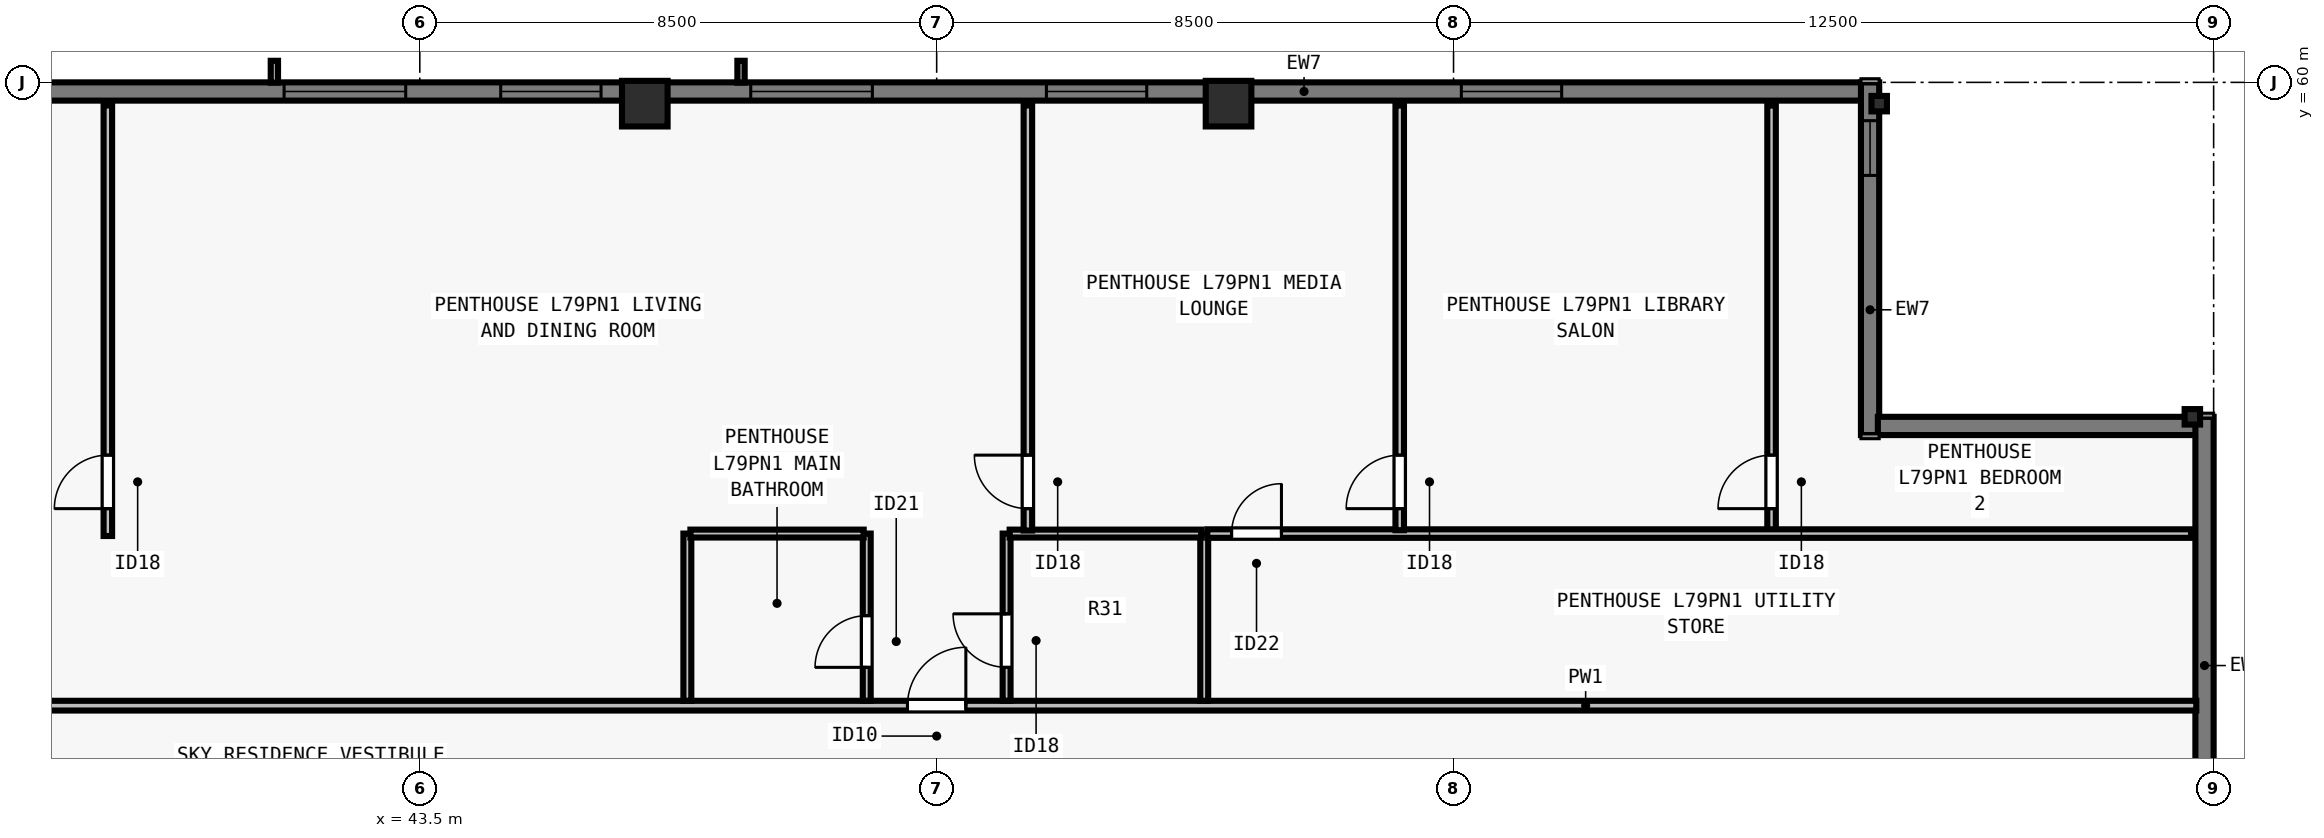
"""IFC4 building model, lengths in metres.
Left out: names, types, materials, properties, quantities, classifications, styles, units other than length and angle.
Written with IfcOpenShell. Run it as: python <this file> out.ifc"""

import sys

from ifc_helpers import new_model, si_unit, direction, frame, frame_2d, origin, origin_2d, place, context, subcontext, project, spatial, rectangle, i_section, extrude, element, fill, save


model = new_model("IFC4")
c1 = context("Model", 3, precision=1e-05, world=origin(), true_north=direction((0.0, 1.0)))
c2 = subcontext(c1, "Body", "Model", "MODEL_VIEW")
j1 = project(units=[si_unit("LENGTHUNIT", "METRE"), si_unit("PLANEANGLEUNIT", "RADIAN")], contexts=[c1])
p1 = place(None, origin())
s1 = spatial("IfcSite", under=j1, at=p1, CompositionType="ELEMENT")
p2 = place(p1, origin())
s2 = spatial("IfcBuilding", under=s1, at=p2, CompositionType="ELEMENT")
p3 = place(p2, frame((0.0, 0.0, 287.5)))
s3 = spatial("IfcBuildingStorey", under=s2, at=p3, CompositionType="ELEMENT", Elevation=287.5)
for number, where, z_axis, x_axis in (
    (1, (72.65, 54.5, 0.0), (0.0, 0.0, 1.0), (0.0, 1.0, 0.0)),
    (2, (67.5, 59.65, 0.0), (0.0, 0.0, 1.0), (1.0, 0.0, 0.0)),
):
    element("IfcColumn", number, at=place(p3, frame(where, z_axis=z_axis, x_axis=x_axis)), inside=s3, PredefinedType="COLUMN", context=c2, shape_type="SweptSolid", body=[
        extrude(i_section(OverallWidth=0.254, OverallDepth=0.254, WebThickness=0.009, FlangeThickness=0.014, FilletRadius=0.013, at=origin_2d()), origin(), (0.0, 0.0, 1.0), 3.5),
    ])
for number, where, z_axis, x_axis in (
    (3, (56.8, 59.65, 0.0), (0.0, 0.0, 1.0), (1.0, 0.0, 0.0)),
    (4, (47.2, 59.65, 0.0), (0.0, 0.0, 1.0), (1.0, 0.0, 0.0)),
):
    element("IfcColumn", number, at=place(p3, frame(where, z_axis=z_axis, x_axis=x_axis)), inside=s3, PredefinedType="COLUMN", context=c2, shape_type="SweptSolid", body=[
        extrude(rectangle(XDim=0.75, YDim=0.75, at=origin_2d()), origin(), (0.0, 0.0, 1.0), 3.5),
    ])
p4 = place(p3, frame((36.5, 59.85, 0.0), z_axis=(0.0, 0.0, 1.0), x_axis=(1.0, 0.0, 0.0)))
e5 = element("IfcWall", 5, at=p4, inside=s3, PredefinedType="SOLIDWALL", context=c2, shape_type="SweptSolid", body=[
    extrude(rectangle(XDim=30.722, YDim=0.3, at=frame_2d((15.361, 0.0))), origin(), (0.0, 0.0, 1.0), 3.29),
])
p5 = place(p4, frame((4.769, 0.0, 0.8)))
e6 = element("IfcOpeningElement", 6, at=p5, cuts=e5, PredefinedType="OPENING", context=c2, shape_type="SweptSolid", body=[
    extrude(rectangle(XDim=2.0, YDim=1.758, at=frame_2d((1.0, 0.879))), frame((0.0, 0.16, 0.0), z_axis=(0.0, -1.0, 0.0), x_axis=(1.0, 0.0, 0.0)), (0.0, 0.0, 1.0), 0.32),
])
p6 = place(p4, frame((8.331, 0.0, 0.8)))
e7 = element("IfcOpeningElement", 7, at=p6, cuts=e5, PredefinedType="OPENING", context=c2, shape_type="SweptSolid", body=[
    extrude(rectangle(XDim=1.65, YDim=1.758, at=frame_2d((0.825, 0.879))), frame((0.0, 0.16, 0.0), z_axis=(0.0, -1.0, 0.0), x_axis=(1.0, 0.0, 0.0)), (0.0, 0.0, 1.0), 0.32),
])
p7 = place(p4, frame((12.442, 0.0, 0.8)))
e8 = element("IfcOpeningElement", 8, at=p7, cuts=e5, PredefinedType="OPENING", context=c2, shape_type="SweptSolid", body=[
    extrude(rectangle(XDim=2.0, YDim=1.758, at=frame_2d((1.0, 0.879))), frame((0.0, 0.16, 0.0), z_axis=(0.0, -1.0, 0.0), x_axis=(1.0, 0.0, 0.0)), (0.0, 0.0, 1.0), 0.32),
])
p8 = place(p4, frame((17.304, 0.0, 0.8)))
e9 = element("IfcOpeningElement", 9, at=p8, cuts=e5, PredefinedType="OPENING", context=c2, shape_type="SweptSolid", body=[
    extrude(rectangle(XDim=1.65, YDim=1.758, at=frame_2d((0.825, 0.879))), frame((0.0, 0.16, 0.0), z_axis=(0.0, -1.0, 0.0), x_axis=(1.0, 0.0, 0.0)), (0.0, 0.0, 1.0), 0.32),
])
p9 = place(p4, frame((24.128, 0.0, 0.8)))
e10 = element("IfcOpeningElement", 10, at=p9, cuts=e5, PredefinedType="OPENING", context=c2, shape_type="SweptSolid", body=[
    extrude(rectangle(XDim=1.65, YDim=1.758, at=frame_2d((0.825, 0.879))), frame((0.0, 0.16, 0.0), z_axis=(0.0, -1.0, 0.0), x_axis=(1.0, 0.0, 0.0)), (0.0, 0.0, 1.0), 0.32),
])
p10 = place(p3, frame((67.35, 60.0, 0.0), z_axis=(0.0, 0.0, 1.0), x_axis=(0.0, -1.0, 0.0)))
e11 = element("IfcWall", 11, at=p10, inside=s3, PredefinedType="SOLIDWALL", context=c2, shape_type="SweptSolid", body=[
    extrude(rectangle(XDim=5.8, YDim=0.3, at=frame_2d((2.9, 0.0))), origin(), (0.0, 0.0, 1.0), 3.29),
])
p11 = place(p10, frame((0.63, 0.0, 0.8)))
e12 = element("IfcOpeningElement", 12, at=p11, cuts=e11, PredefinedType="OPENING", context=c2, shape_type="SweptSolid", body=[
    extrude(rectangle(XDim=0.9, YDim=1.75, at=frame_2d((0.45, 0.875))), frame((0.0, 0.16, 0.0), z_axis=(0.0, -1.0, 0.0), x_axis=(1.0, 0.0, 0.0)), (0.0, 0.0, 1.0), 0.32),
])
p12 = place(p3, frame((67.478, 54.35, 0.0), z_axis=(0.0, 0.0, 1.0), x_axis=(1.0, 0.0, 0.0)))
e13 = element("IfcWall", 13, at=p12, inside=s3, PredefinedType="SOLIDWALL", context=c2, shape_type="SweptSolid", body=[
    extrude(rectangle(XDim=5.244, YDim=0.3, at=frame_2d((2.622, 0.0))), origin(), (0.0, 0.0, 1.0), 3.29),
])
p13 = place(p3, frame((72.85, 54.5, 0.0), z_axis=(0.0, 0.0, 1.0), x_axis=(0.0, -1.0, 0.0)))
e14 = element("IfcWall", 14, at=p13, inside=s3, PredefinedType="SOLIDWALL", context=c2, shape_type="SweptSolid", body=[
    extrude(rectangle(XDim=30.722, YDim=0.3, at=frame_2d((15.361, 0.0))), origin(), (0.0, 0.0, 1.0), 3.29),
])
p14 = place(p13, frame((8.331, 0.0, 0.8)))
e15 = element("IfcOpeningElement", 15, at=p14, cuts=e14, PredefinedType="OPENING", context=c2, shape_type="SweptSolid", body=[
    extrude(rectangle(XDim=1.65, YDim=1.758, at=frame_2d((0.825, 0.879))), frame((0.0, 0.16, 0.0), z_axis=(0.0, -1.0, 0.0), x_axis=(1.0, 0.0, 0.0)), (0.0, 0.0, 1.0), 0.32),
])
p15 = place(p13, frame((11.593, 0.0, 0.8)))
e16 = element("IfcOpeningElement", 16, at=p15, cuts=e14, PredefinedType="OPENING", context=c2, shape_type="SweptSolid", body=[
    extrude(rectangle(XDim=2.0, YDim=1.758, at=frame_2d((1.0, 0.879))), frame((0.0, 0.16, 0.0), z_axis=(0.0, -1.0, 0.0), x_axis=(1.0, 0.0, 0.0)), (0.0, 0.0, 1.0), 0.32),
])
p16 = place(p13, frame((16.455, 0.0, 0.8)))
e17 = element("IfcOpeningElement", 17, at=p16, cuts=e14, PredefinedType="OPENING", context=c2, shape_type="SweptSolid", body=[
    extrude(rectangle(XDim=1.65, YDim=1.758, at=frame_2d((0.825, 0.879))), frame((0.0, 0.16, 0.0), z_axis=(0.0, -1.0, 0.0), x_axis=(1.0, 0.0, 0.0)), (0.0, 0.0, 1.0), 0.32),
])
p17 = place(p13, frame((20.967, 0.0, 0.8)))
e18 = element("IfcOpeningElement", 18, at=p17, cuts=e14, PredefinedType="OPENING", context=c2, shape_type="SweptSolid", body=[
    extrude(rectangle(XDim=2.0, YDim=1.758, at=frame_2d((1.0, 0.879))), frame((0.0, 0.16, 0.0), z_axis=(0.0, -1.0, 0.0), x_axis=(1.0, 0.0, 0.0)), (0.0, 0.0, 1.0), 0.32),
])
p18 = place(p3, frame((31.285, 49.75, 0.0), z_axis=(0.0, 0.0, 1.0), x_axis=(1.0, 0.0, 0.0)))
e19 = element("IfcWall", 19, at=p18, inside=s3, PredefinedType="PARTITIONING", context=c2, shape_type="SweptSolid", body=[
    extrude(rectangle(XDim=41.43, YDim=0.16, at=frame_2d((20.715, 0.0))), origin(), (0.0, 0.0, 1.0), 3.009),
])
p19 = place(p18, frame((20.235, 0.0, 0.0)))
e20 = element("IfcOpeningElement", 20, at=p19, cuts=e19, PredefinedType="OPENING", context=c2, shape_type="SweptSolid", body=[
    extrude(rectangle(XDim=0.96, YDim=2.18, at=frame_2d((0.48, 1.09))), frame((0.0, 0.09, 0.0), z_axis=(0.0, -1.0, 0.0), x_axis=(1.0, 0.0, 0.0)), (0.0, 0.0, 1.0), 0.18),
])
p20 = place(p3, frame((47.9, 49.83, 0.0), z_axis=(0.0, 0.0, 1.0), x_axis=(0.0, 1.0, 0.0)))
e21 = element("IfcWall", 21, at=p20, inside=s3, PredefinedType="PLUMBINGWALL", context=c2, shape_type="SweptSolid", body=[
    extrude(rectangle(XDim=2.75, YDim=0.13, at=frame_2d((1.375, 0.0))), origin(), (0.0, 0.0, 1.0), 3.29),
])
p21 = place(p3, frame((50.85, 49.83, 0.0), z_axis=(0.0, 0.0, 1.0), x_axis=(0.0, 1.0, 0.0)))
e22 = element("IfcWall", 22, at=p21, inside=s3, PredefinedType="PLUMBINGWALL", context=c2, shape_type="SweptSolid", body=[
    extrude(rectangle(XDim=2.75, YDim=0.13, at=frame_2d((1.375, 0.0))), origin(), (0.0, 0.0, 1.0), 3.009),
])
p22 = place(p21, frame((0.55, 0.0, 0.0)))
e23 = element("IfcOpeningElement", 23, at=p22, cuts=e22, PredefinedType="OPENING", context=c2, shape_type="SweptSolid", body=[
    extrude(rectangle(XDim=0.85, YDim=2.08, at=frame_2d((0.425, 1.04))), frame((0.0, 0.075, 0.0), z_axis=(0.0, -1.0, 0.0), x_axis=(1.0, 0.0, 0.0)), (0.0, 0.0, 1.0), 0.15),
])
p23 = place(p3, frame((47.95, 52.58, 0.0), z_axis=(0.0, 0.0, 1.0), x_axis=(1.0, 0.0, 0.0)))
e24 = element("IfcWall", 24, at=p23, inside=s3, PredefinedType="PLUMBINGWALL", context=c2, shape_type="SweptSolid", body=[
    extrude(rectangle(XDim=2.85, YDim=0.13, at=frame_2d((1.425, 0.0))), origin(), (0.0, 0.0, 1.0), 3.29),
])
p24 = place(p3, frame((56.4, 49.83, 0.0), z_axis=(0.0, 0.0, 1.0), x_axis=(0.0, 1.0, 0.0)))
e25 = element("IfcWall", 25, at=p24, inside=s3, PredefinedType="PLUMBINGWALL", context=c2, shape_type="SweptSolid", body=[
    extrude(rectangle(XDim=2.75, YDim=0.13, at=frame_2d((1.375, 0.0))), origin(), (0.0, 0.0, 1.0), 3.29),
])
p25 = place(p3, frame((53.15, 49.83, 0.0), z_axis=(0.0, 0.0, 1.0), x_axis=(0.0, 1.0, 0.0)))
e26 = element("IfcWall", 26, at=p25, inside=s3, PredefinedType="PLUMBINGWALL", context=c2, shape_type="SweptSolid", body=[
    extrude(rectangle(XDim=2.75, YDim=0.13, at=frame_2d((1.375, 0.0))), origin(), (0.0, 0.0, 1.0), 3.29),
])
p26 = place(p25, frame((0.55, 0.0, 0.0)))
e27 = element("IfcOpeningElement", 27, at=p26, cuts=e26, PredefinedType="OPENING", context=c2, shape_type="SweptSolid", body=[
    extrude(rectangle(XDim=0.88, YDim=2.1, at=frame_2d((0.44, 1.05))), frame((0.0, 0.075, 0.0), z_axis=(0.0, -1.0, 0.0), x_axis=(1.0, 0.0, 0.0)), (0.0, 0.0, 1.0), 0.15),
])
p27 = place(p3, frame((53.2, 52.58, 0.0), z_axis=(0.0, 0.0, 1.0), x_axis=(1.0, 0.0, 0.0)))
e28 = element("IfcWall", 28, at=p27, inside=s3, PredefinedType="PLUMBINGWALL", context=c2, shape_type="SweptSolid", body=[
    extrude(rectangle(XDim=3.15, YDim=0.13, at=frame_2d((1.575, 0.0))), origin(), (0.0, 0.0, 1.0), 3.29),
])
p28 = place(p3, frame((38.37, 52.54, 0.0), z_axis=(0.0, 0.0, 1.0), x_axis=(0.0, 1.0, 0.0)))
e29 = element("IfcWall", 29, at=p28, inside=s3, PredefinedType="PARTITIONING", context=c2, shape_type="SweptSolid", body=[
    extrude(rectangle(XDim=7.08, YDim=0.14, at=frame_2d((3.54, 0.0))), origin(), (0.0, 0.0, 1.0), 2.653),
])
p29 = place(p28, frame((0.45, 0.0, 0.0)))
e30 = element("IfcOpeningElement", 30, at=p29, cuts=e29, PredefinedType="OPENING", context=c2, shape_type="SweptSolid", body=[
    extrude(rectangle(XDim=0.88, YDim=2.1, at=frame_2d((0.44, 1.05))), frame((0.0, 0.08, 0.0), z_axis=(0.0, -1.0, 0.0), x_axis=(1.0, 0.0, 0.0)), (0.0, 0.0, 1.0), 0.16),
])
p30 = place(p3, frame((65.73, 52.54, 0.0), z_axis=(0.0, 0.0, 1.0), x_axis=(0.0, 1.0, 0.0)))
e31 = element("IfcWall", 31, at=p30, inside=s3, PredefinedType="PARTITIONING", context=c2, shape_type="SweptSolid", body=[
    extrude(rectangle(XDim=7.08, YDim=0.14, at=frame_2d((3.54, 0.0))), origin(), (0.0, 0.0, 1.0), 2.653),
])
p31 = place(p30, frame((0.45, 0.0, 0.0)))
e32 = element("IfcOpeningElement", 32, at=p31, cuts=e31, PredefinedType="OPENING", context=c2, shape_type="SweptSolid", body=[
    extrude(rectangle(XDim=0.88, YDim=2.1, at=frame_2d((0.44, 1.05))), frame((0.0, 0.08, 0.0), z_axis=(0.0, -1.0, 0.0), x_axis=(1.0, 0.0, 0.0)), (0.0, 0.0, 1.0), 0.16),
])
p32 = place(p3, frame((56.45, 52.58, 0.0), z_axis=(0.0, 0.0, 1.0), x_axis=(1.0, 0.0, 0.0)))
e33 = element("IfcWall", 33, at=p32, inside=s3, PredefinedType="PARTITIONING", context=c2, shape_type="SweptSolid", body=[
    extrude(rectangle(XDim=16.18, YDim=0.14, at=frame_2d((8.09, 0.0))), origin(), (0.0, 0.0, 1.0), 3.009),
])
p33 = place(p32, frame((0.4, 0.0, 0.0)))
e34 = element("IfcOpeningElement", 34, at=p33, cuts=e33, PredefinedType="OPENING", context=c2, shape_type="SweptSolid", body=[
    extrude(rectangle(XDim=0.82, YDim=2.1, at=frame_2d((0.41, 1.05))), frame((0.0, 0.08, 0.0), z_axis=(0.0, -1.0, 0.0), x_axis=(1.0, 0.0, 0.0)), (0.0, 0.0, 1.0), 0.16),
])
p34 = place(p3, frame((53.5, 52.63, 0.0), z_axis=(0.0, 0.0, 1.0), x_axis=(0.0, 1.0, 0.0)))
e35 = element("IfcWall", 35, at=p34, inside=s3, PredefinedType="PARTITIONING", context=c2, shape_type="SweptSolid", body=[
    extrude(rectangle(XDim=6.99, YDim=0.14, at=frame_2d((3.495, 0.0))), origin(), (0.0, 0.0, 1.0), 3.009),
])
p35 = place(p34, frame((0.36, 0.0, 0.0)))
e36 = element("IfcOpeningElement", 36, at=p35, cuts=e35, PredefinedType="OPENING", context=c2, shape_type="SweptSolid", body=[
    extrude(rectangle(XDim=0.88, YDim=2.1, at=frame_2d((0.44, 1.05))), frame((0.0, 0.08, 0.0), z_axis=(0.0, -1.0, 0.0), x_axis=(1.0, 0.0, 0.0)), (0.0, 0.0, 1.0), 0.16),
])
p36 = place(p3, frame((59.615, 52.635, 0.0), z_axis=(0.0, 0.0, 1.0), x_axis=(0.0, 1.0, 0.0)))
e37 = element("IfcWall", 37, at=p36, inside=s3, PredefinedType="PARTITIONING", context=c2, shape_type="SweptSolid", body=[
    extrude(rectangle(XDim=6.985, YDim=0.14, at=frame_2d((3.493, 0.0))), origin(), (0.0, 0.0, 1.0), 3.29),
])
p37 = place(p36, frame((0.355, 0.0, 0.0)))
e38 = element("IfcOpeningElement", 38, at=p37, cuts=e37, PredefinedType="OPENING", context=c2, shape_type="SweptSolid", body=[
    extrude(rectangle(XDim=0.88, YDim=2.1, at=frame_2d((0.44, 1.05))), frame((0.0, 0.08, 0.0), z_axis=(0.0, -1.0, 0.0), x_axis=(1.0, 0.0, 0.0)), (0.0, 0.0, 1.0), 0.16),
])
p38 = place(p5, origin())
e39 = element("IfcWindow", 39, at=p38, inside=s3, PartitioningType="SINGLE_PANEL", PredefinedType="WINDOW", context=c2, shape_type="SweptSolid", body=[
    extrude(rectangle(XDim=2.0, YDim=1.758, at=frame_2d((1.0, 0.879))), frame((0.0, -0.05, 0.0), z_axis=(0.0, -1.0, 0.0), x_axis=(1.0, 0.0, 0.0)), (0.0, 0.0, 1.0), 0.06),
])
fill(e6, e39)
p39 = place(p6, origin())
e40 = element("IfcWindow", 40, at=p39, inside=s3, PartitioningType="SINGLE_PANEL", PredefinedType="WINDOW", context=c2, shape_type="SweptSolid", body=[
    extrude(rectangle(XDim=1.65, YDim=1.758, at=frame_2d((0.825, 0.879))), frame((0.0, -0.05, 0.0), z_axis=(0.0, -1.0, 0.0), x_axis=(1.0, 0.0, 0.0)), (0.0, 0.0, 1.0), 0.06),
])
fill(e7, e40)
p40 = place(p7, origin())
e41 = element("IfcWindow", 41, at=p40, inside=s3, PartitioningType="SINGLE_PANEL", PredefinedType="WINDOW", context=c2, shape_type="SweptSolid", body=[
    extrude(rectangle(XDim=2.0, YDim=1.758, at=frame_2d((1.0, 0.879))), frame((0.0, -0.05, 0.0), z_axis=(0.0, -1.0, 0.0), x_axis=(1.0, 0.0, 0.0)), (0.0, 0.0, 1.0), 0.06),
])
fill(e8, e41)
p41 = place(p8, origin())
e42 = element("IfcWindow", 42, at=p41, inside=s3, PartitioningType="SINGLE_PANEL", PredefinedType="WINDOW", context=c2, shape_type="SweptSolid", body=[
    extrude(rectangle(XDim=1.65, YDim=1.758, at=frame_2d((0.825, 0.879))), frame((0.0, -0.05, 0.0), z_axis=(0.0, -1.0, 0.0), x_axis=(1.0, 0.0, 0.0)), (0.0, 0.0, 1.0), 0.06),
])
fill(e9, e42)
p42 = place(p9, origin())
e43 = element("IfcWindow", 43, at=p42, inside=s3, PartitioningType="SINGLE_PANEL", PredefinedType="WINDOW", context=c2, shape_type="SweptSolid", body=[
    extrude(rectangle(XDim=1.65, YDim=1.758, at=frame_2d((0.825, 0.879))), frame((0.0, -0.05, 0.0), z_axis=(0.0, -1.0, 0.0), x_axis=(1.0, 0.0, 0.0)), (0.0, 0.0, 1.0), 0.06),
])
fill(e10, e43)
p43 = place(p11, origin())
e44 = element("IfcWindow", 44, at=p43, inside=s3, PartitioningType="SINGLE_PANEL", PredefinedType="WINDOW", context=c2, shape_type="SweptSolid", body=[
    extrude(rectangle(XDim=0.9, YDim=1.75, at=frame_2d((0.45, 0.875))), frame((0.0, -0.04, 0.0), z_axis=(0.0, -1.0, 0.0), x_axis=(1.0, 0.0, 0.0)), (0.0, 0.0, 1.0), 0.06),
])
fill(e12, e44)
p44 = place(p22, origin())
e45 = element("IfcDoor", 45, at=p44, inside=s3, OperationType="SINGLE_SWING_LEFT", PredefinedType="DOOR", context=c2, shape_type="SweptSolid", body=[
    extrude(rectangle(XDim=0.85, YDim=2.08, at=frame_2d((0.425, 1.04))), frame((0.0, 0.025, 0.0), z_axis=(0.0, -1.0, 0.0), x_axis=(1.0, 0.0, 0.0)), (0.0, 0.0, 1.0), 0.05),
])
fill(e23, e45)
p45 = place(p26, origin())
e46 = element("IfcDoor", 46, at=p45, inside=s3, OperationType="SINGLE_SWING_RIGHT", PredefinedType="DOOR", context=c2, shape_type="SweptSolid", body=[
    extrude(rectangle(XDim=0.88, YDim=2.1, at=frame_2d((0.44, 1.05))), frame((0.0, 0.025, 0.0), z_axis=(0.0, -1.0, 0.0), x_axis=(1.0, 0.0, 0.0)), (0.0, 0.0, 1.0), 0.05),
])
fill(e27, e46)
p46 = place(p29, origin())
e47 = element("IfcDoor", 47, at=p46, inside=s3, OperationType="SINGLE_SWING_LEFT", PredefinedType="DOOR", context=c2, shape_type="SweptSolid", body=[
    extrude(rectangle(XDim=0.88, YDim=2.1, at=frame_2d((0.44, 1.05))), frame((0.0, 0.025, 0.0), z_axis=(0.0, -1.0, 0.0), x_axis=(1.0, 0.0, 0.0)), (0.0, 0.0, 1.0), 0.05),
])
fill(e30, e47)
p47 = place(p33, origin())
e48 = element("IfcDoor", 48, at=p47, inside=s3, OperationType="SINGLE_SWING_RIGHT", PredefinedType="DOOR", context=c2, shape_type="SweptSolid", body=[
    extrude(rectangle(XDim=0.82, YDim=2.1, at=frame_2d((0.41, 1.05))), frame((0.0, 0.025, 0.0), z_axis=(0.0, -1.0, 0.0), x_axis=(1.0, 0.0, 0.0)), (0.0, 0.0, 1.0), 0.05),
])
fill(e34, e48)
p48 = place(p31, origin())
e49 = element("IfcDoor", 49, at=p48, inside=s3, OperationType="SINGLE_SWING_LEFT", PredefinedType="DOOR", context=c2, shape_type="SweptSolid", body=[
    extrude(rectangle(XDim=0.88, YDim=2.1, at=frame_2d((0.44, 1.05))), frame((0.0, 0.025, 0.0), z_axis=(0.0, -1.0, 0.0), x_axis=(1.0, 0.0, 0.0)), (0.0, 0.0, 1.0), 0.05),
])
fill(e32, e49)
p49 = place(p35, origin())
e50 = element("IfcDoor", 50, at=p49, inside=s3, OperationType="SINGLE_SWING_RIGHT", PredefinedType="DOOR", context=c2, shape_type="SweptSolid", body=[
    extrude(rectangle(XDim=0.88, YDim=2.1, at=frame_2d((0.44, 1.05))), frame((0.0, 0.025, 0.0), z_axis=(0.0, -1.0, 0.0), x_axis=(1.0, 0.0, 0.0)), (0.0, 0.0, 1.0), 0.05),
])
fill(e36, e50)
p50 = place(p37, origin())
e51 = element("IfcDoor", 51, at=p50, inside=s3, OperationType="SINGLE_SWING_LEFT", PredefinedType="DOOR", context=c2, shape_type="SweptSolid", body=[
    extrude(rectangle(XDim=0.88, YDim=2.1, at=frame_2d((0.44, 1.05))), frame((0.0, 0.025, 0.0), z_axis=(0.0, -1.0, 0.0), x_axis=(1.0, 0.0, 0.0)), (0.0, 0.0, 1.0), 0.05),
])
fill(e38, e51)
p51 = place(p19, origin())
e52 = element("IfcDoor", 52, at=p51, inside=s3, OperationType="SINGLE_SWING_RIGHT", PredefinedType="DOOR", context=c2, shape_type="SweptSolid", body=[
    extrude(rectangle(XDim=0.96, YDim=2.18, at=frame_2d((0.48, 1.09))), frame((0.0, 0.025, 0.0), z_axis=(0.0, -1.0, 0.0), x_axis=(1.0, 0.0, 0.0)), (0.0, 0.0, 1.0), 0.05),
])
fill(e20, e52)
save(model, sys.argv[1])
